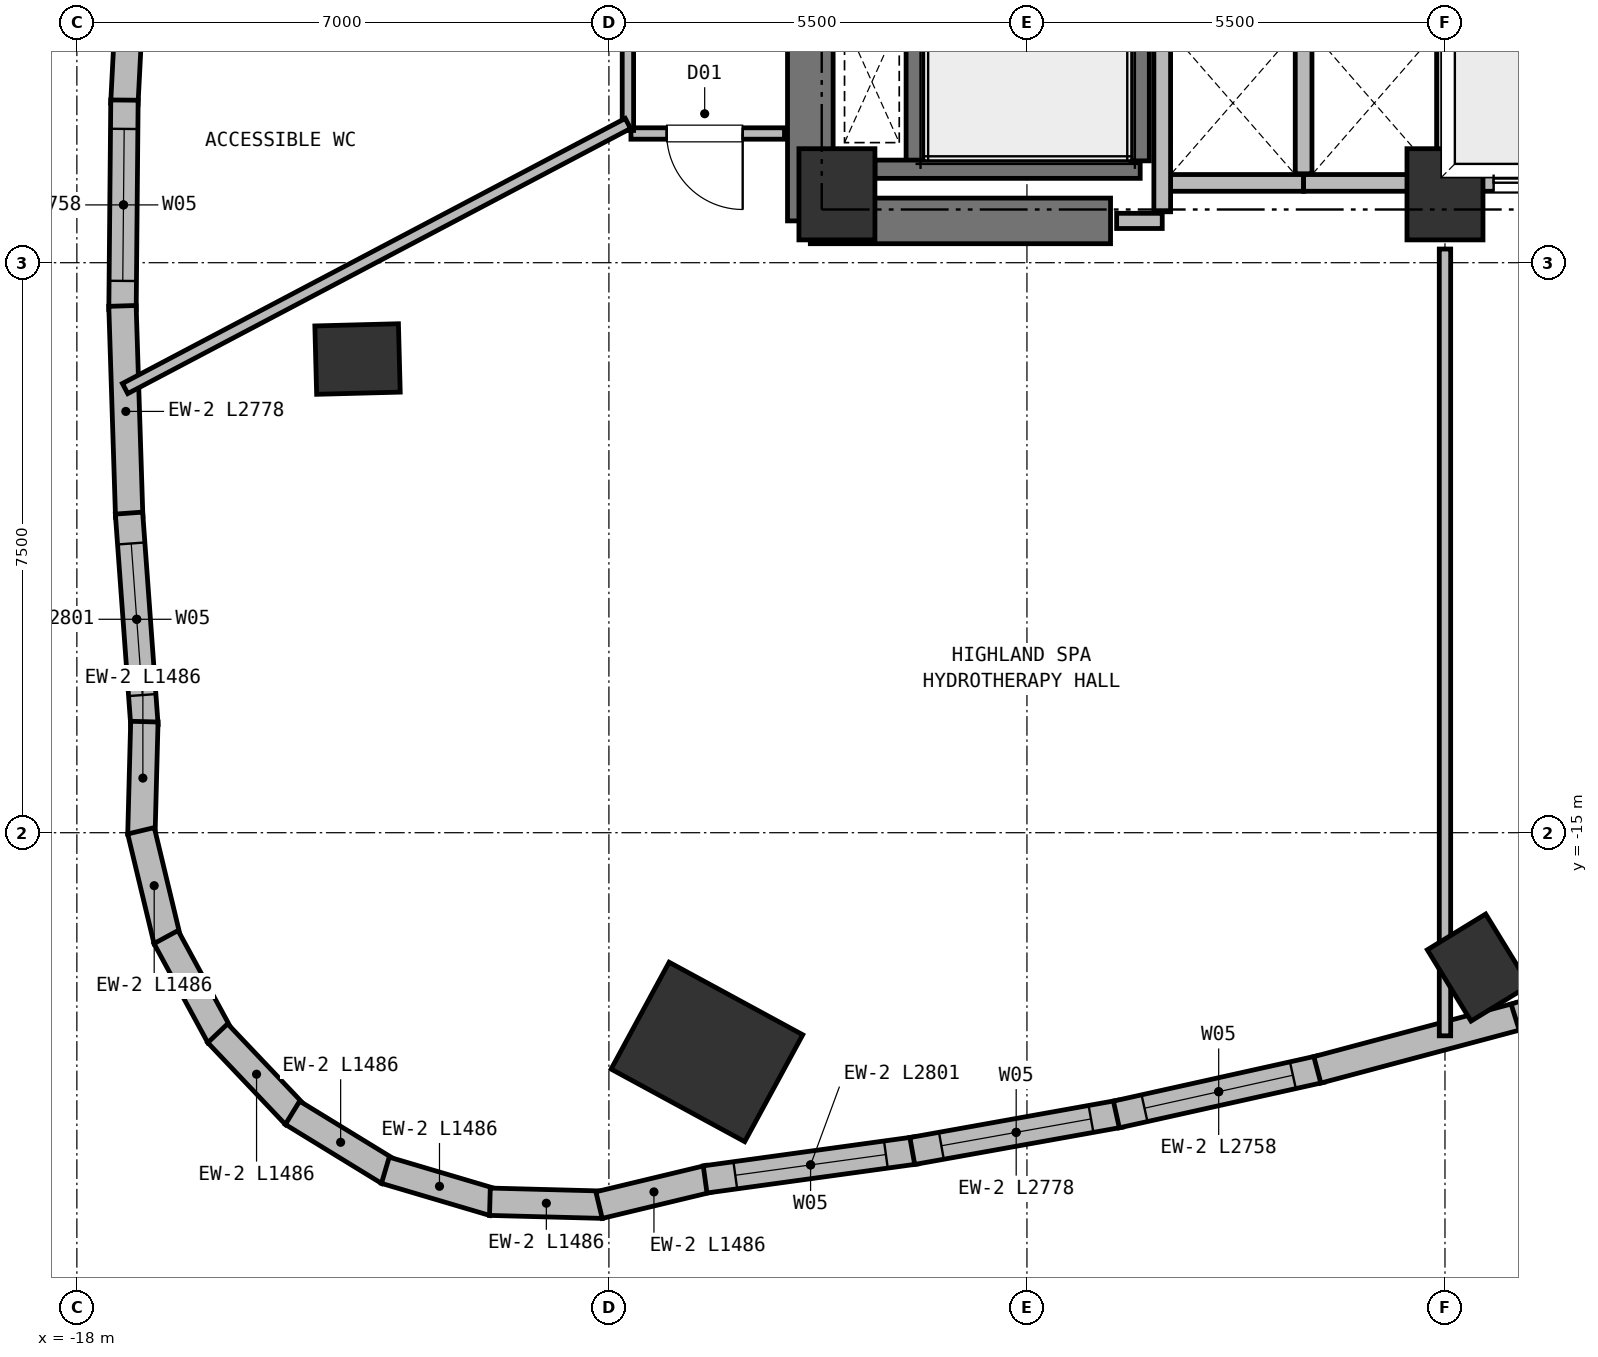
"""IFC4 building model, lengths in metres.
Left out: names, types, materials, properties, quantities, classifications, styles, units other than length and angle.
Written with IfcOpenShell. Run it as: python <this file> out.ifc"""

import sys

from ifc_helpers import new_model, si_unit, direction, frame, frame_2d, origin, origin_2d, place, context, subcontext, project, spatial, rectangle, extrude, element, fill, save


model = new_model("IFC4")
c1 = context("Model", 3, precision=1e-05, world=origin(), true_north=direction((0.0, 1.0)))
c2 = subcontext(c1, "Body", "Model", "MODEL_VIEW")
j1 = project(units=[si_unit("LENGTHUNIT", "METRE"), si_unit("PLANEANGLEUNIT", "RADIAN")], contexts=[c1])
p1 = place(None, origin())
s1 = spatial("IfcSite", under=j1, at=p1, CompositionType="ELEMENT")
p2 = place(p1, origin())
s2 = spatial("IfcBuilding", under=s1, at=p2, CompositionType="ELEMENT")
p3 = place(p2, frame((0.0, 0.0, 92.75)))
s3 = spatial("IfcBuildingStorey", under=s2, at=p3, CompositionType="ELEMENT", Elevation=92.75)
for number, where, z_axis, x_axis in (
    (1, (-8.0, -6.6, 0.0), (0.0, 0.0, 1.0), (1.0, 0.0, 0.0)),
    (2, (0.0, -6.6, 0.0), (0.0, 0.0, 1.0), (1.0, 0.0, 0.0)),
):
    element("IfcColumn", number, at=place(p3, frame(where, z_axis=z_axis, x_axis=x_axis)), inside=s3, PredefinedType="COLUMN", context=c2, shape_type="SweptSolid", body=[
        extrude(rectangle(XDim=1.0, YDim=1.2, at=origin_2d()), origin(), (0.0, 0.0, 1.0), 4.5),
    ])
p4 = place(p3, frame((-8.35, -6.95, 0.0), z_axis=(0.0, 0.0, 1.0), x_axis=(1.0, 0.0, 0.0)))
e3 = element("IfcWall", 3, at=p4, inside=s3, PredefinedType="SHEAR", context=c2, shape_type="SweptSolid", body=[
    extrude(rectangle(XDim=3.95, YDim=0.6, at=frame_2d((1.975, 0.0))), origin(), (0.0, 0.0, 1.0), 4.25),
])
p5 = place(p3, frame((-8.35, -6.95, 0.0), z_axis=(0.0, 0.0, 1.0), x_axis=(0.0, 1.0, 0.0)))
e4 = element("IfcWall", 4, at=p5, inside=s3, PredefinedType="SHEAR", context=c2, shape_type="SweptSolid", body=[
    extrude(rectangle(XDim=8.1, YDim=0.6, at=frame_2d((4.05, 0.0))), origin(), (0.0, 0.0, 1.0), 4.25),
])
p6 = place(p3, frame((-14.307, -8.768, 0.0), z_axis=(0.0, 0.0, 1.0), x_axis=(-0.026176948308, 0.999657324976, 0.0)))
e5 = element("IfcColumn", 5, at=p6, inside=s3, PredefinedType="COLUMN", context=c2, shape_type="SweptSolid", body=[
    extrude(rectangle(XDim=0.9, YDim=1.1, at=origin_2d()), origin(), (0.0, 0.0, 1.0), 4.5),
])
p7 = place(p3, frame((-9.71, -17.885, 0.0), z_axis=(0.0, 0.0, 1.0), x_axis=(0.47715876026, 0.878817112662, 0.0)))
e6 = element("IfcColumn", 6, at=p7, inside=s3, PredefinedType="COLUMN", context=c2, shape_type="SweptSolid", body=[
    extrude(rectangle(XDim=1.6, YDim=2.0, at=origin_2d()), origin(), (0.0, 0.0, 1.0), 4.5),
])
p8 = place(p3, frame((0.439, -16.774, 0.0), z_axis=(0.0, 0.0, 1.0), x_axis=(0.852640164354, 0.522498564716, 0.0)))
e7 = element("IfcColumn", 7, at=p8, inside=s3, PredefinedType="COLUMN", context=c2, shape_type="SweptSolid", body=[
    extrude(rectangle(XDim=0.9, YDim=1.1, at=origin_2d()), origin(), (0.0, 0.0, 1.0), 4.5),
])
p9 = place(p3, frame((-17.375, -5.41, 0.0), z_axis=(0.0, 0.0, 1.0), x_axis=(0.051157869298, 0.998690578913, 0.0)))
e8 = element("IfcWall", 8, at=p9, inside=s3, PredefinedType="SOLIDWALL", context=c2, shape_type="SweptSolid", body=[
    extrude(rectangle(XDim=2.744, YDim=0.36, at=frame_2d((1.372, 0.0))), origin(), (0.0, 0.0, 1.0), 4.25),
])
p10 = place(p3, frame((-17.4, -8.119, 0.0), z_axis=(0.0, 0.0, 1.0), x_axis=(0.009381778629, 0.999955990146, 0.0)))
e9 = element("IfcWall", 9, at=p10, inside=s3, PredefinedType="SOLIDWALL", context=c2, shape_type="SweptSolid", body=[
    extrude(rectangle(XDim=2.758, YDim=0.36, at=frame_2d((1.379, 0.0))), origin(), (0.0, 0.0, 1.0), 4.25),
])
p11 = place(p10, frame((0.379, 0.0, 0.72)))
e10 = element("IfcOpeningElement", 10, at=p11, cuts=e9, PredefinedType="OPENING", context=c2, shape_type="SweptSolid", body=[
    extrude(rectangle(XDim=2.0, YDim=2.15, at=frame_2d((1.0, 1.075))), frame((0.0, 0.19, 0.0), z_axis=(0.0, -1.0, 0.0), x_axis=(1.0, 0.0, 0.0)), (0.0, 0.0, 1.0), 0.38),
])
p12 = place(p3, frame((-17.312, -10.845, 0.0), z_axis=(0.0, 0.0, 1.0), x_axis=(-0.031907059623, 0.999490840151, 0.0)))
e11 = element("IfcWall", 11, at=p12, inside=s3, PredefinedType="SOLIDWALL", context=c2, shape_type="SweptSolid", body=[
    extrude(rectangle(XDim=2.778, YDim=0.36, at=frame_2d((1.389, 0.0))), origin(), (0.0, 0.0, 1.0), 4.25),
])
p13 = place(p3, frame((-17.111, -13.589, 0.0), z_axis=(0.0, 0.0, 1.0), x_axis=(-0.072603479606, 0.99736088491, 0.0)))
e12 = element("IfcWall", 12, at=p13, inside=s3, PredefinedType="SOLIDWALL", context=c2, shape_type="SweptSolid", body=[
    extrude(rectangle(XDim=2.801, YDim=0.36, at=frame_2d((1.4, 0.0))), origin(), (0.0, 0.0, 1.0), 4.25),
])
p14 = place(p13, frame((0.401, 0.0, 0.72)))
e13 = element("IfcOpeningElement", 13, at=p14, cuts=e12, PredefinedType="OPENING", context=c2, shape_type="SweptSolid", body=[
    extrude(rectangle(XDim=2.0, YDim=2.15, at=frame_2d((1.0, 1.075))), frame((0.0, 0.19, 0.0), z_axis=(0.0, -1.0, 0.0), x_axis=(1.0, 0.0, 0.0)), (0.0, 0.0, 1.0), 0.38),
])
p15 = place(p3, frame((-17.151, -15.024, 0.0), z_axis=(0.0, 0.0, 1.0), x_axis=(0.026129494011, 0.999658566483, 0.0)))
e14 = element("IfcWall", 14, at=p15, inside=s3, PredefinedType="SOLIDWALL", context=c2, shape_type="SweptSolid", body=[
    extrude(rectangle(XDim=1.486, YDim=0.36, at=frame_2d((0.743, 0.0))), origin(), (0.0, 0.0, 1.0), 4.25),
])
for number, where, z_axis, x_axis in (
    (15, (-16.809, -16.419, 0.0), (0.0, 0.0, 1.0), (-0.233, 0.972, 0.0)),
    (16, (-16.118, -17.679, 0.0), (0.0, 0.0, 1.0), (-0.477, 0.879, 0.0)),
):
    element("IfcWall", number, at=place(p3, frame(where, z_axis=z_axis, x_axis=x_axis)), inside=s3, PredefinedType="SOLIDWALL", context=c2, shape_type="SweptSolid", body=[
        extrude(rectangle(XDim=1.486, YDim=0.36, at=frame_2d((0.743, 0.0))), origin(), (0.0, 0.0, 1.0), 4.25),
    ])
p16 = place(p3, frame((-15.125, -18.717, 0.0), z_axis=(0.0, 0.0, 1.0), x_axis=(-0.688377955726, 0.725352183474, 0.0)))
e17 = element("IfcWall", 17, at=p16, inside=s3, PredefinedType="SOLIDWALL", context=c2, shape_type="SweptSolid", body=[
    extrude(rectangle(XDim=1.486, YDim=0.36, at=frame_2d((0.743, 0.0))), origin(), (0.0, 0.0, 1.0), 4.25),
])
p17 = place(p3, frame((-13.896, -19.462, 0.0), z_axis=(0.0, 0.0, 1.0), x_axis=(-0.852672081239, 0.522446477522, 0.0)))
e18 = element("IfcWall", 18, at=p17, inside=s3, PredefinedType="SOLIDWALL", context=c2, shape_type="SweptSolid", body=[
    extrude(rectangle(XDim=1.486, YDim=0.36, at=frame_2d((0.743, 0.0))), origin(), (0.0, 0.0, 1.0), 4.25),
])
for number, where, z_axis, x_axis in (
    (19, (-12.517, -19.864, 0.0), (0.0, 0.0, 1.0), (-0.959, 0.284, 0.0)),
    (20, (-11.081, -19.895, 0.0), (0.0, 0.0, 1.0), (-1.0, 0.026, 0.0)),
    (21, (-9.685, -19.553, 0.0), (0.0, 0.0, 1.0), (-0.972, -0.233, 0.0)),
):
    element("IfcWall", number, at=place(p3, frame(where, z_axis=z_axis, x_axis=x_axis)), inside=s3, PredefinedType="SOLIDWALL", context=c2, shape_type="SweptSolid", body=[
        extrude(rectangle(XDim=1.486, YDim=0.36, at=frame_2d((0.743, 0.0))), origin(), (0.0, 0.0, 1.0), 4.25),
    ])
p18 = place(p3, frame((-6.959, -19.18, 0.0), z_axis=(0.0, 0.0, 1.0), x_axis=(-0.990654861438, -0.136392615303, 0.0)))
e22 = element("IfcWall", 22, at=p18, inside=s3, PredefinedType="SOLIDWALL", context=c2, shape_type="SweptSolid", body=[
    extrude(rectangle(XDim=2.801, YDim=0.36, at=frame_2d((1.401, 0.0))), origin(), (0.0, 0.0, 1.0), 4.25),
])
p19 = place(p18, frame((0.401, 0.0, 0.72)))
e23 = element("IfcOpeningElement", 23, at=p19, cuts=e22, PredefinedType="OPENING", context=c2, shape_type="SweptSolid", body=[
    extrude(rectangle(XDim=2.0, YDim=2.15, at=frame_2d((1.0, 1.075))), frame((0.0, 0.19, 0.0), z_axis=(0.0, -1.0, 0.0), x_axis=(1.0, 0.0, 0.0)), (0.0, 0.0, 1.0), 0.38),
])
p20 = place(p3, frame((-4.275, -18.698, 0.0), z_axis=(0.0, 0.0, 1.0), x_axis=(-0.984284920637, -0.176587641147, 0.0)))
e24 = element("IfcWall", 24, at=p20, inside=s3, PredefinedType="SOLIDWALL", context=c2, shape_type="SweptSolid", body=[
    extrude(rectangle(XDim=2.778, YDim=0.36, at=frame_2d((1.389, 0.0))), origin(), (0.0, 0.0, 1.0), 4.25),
])
p21 = place(p20, frame((0.389, 0.0, 0.72)))
e25 = element("IfcOpeningElement", 25, at=p21, cuts=e24, PredefinedType="OPENING", context=c2, shape_type="SweptSolid", body=[
    extrude(rectangle(XDim=2.0, YDim=2.15, at=frame_2d((1.0, 1.075))), frame((0.0, 0.19, 0.0), z_axis=(0.0, -1.0, 0.0), x_axis=(1.0, 0.0, 0.0)), (0.0, 0.0, 1.0), 0.38),
])
p22 = place(p3, frame((-1.631, -18.109, 0.0), z_axis=(0.0, 0.0, 1.0), x_axis=(-0.976166230028, -0.217024172276, 0.0)))
e26 = element("IfcWall", 26, at=p22, inside=s3, PredefinedType="SOLIDWALL", context=c2, shape_type="SweptSolid", body=[
    extrude(rectangle(XDim=2.758, YDim=0.36, at=frame_2d((1.379, 0.0))), origin(), (0.0, 0.0, 1.0), 4.25),
])
p23 = place(p22, frame((0.379, 0.0, 0.72)))
e27 = element("IfcOpeningElement", 27, at=p23, cuts=e26, PredefinedType="OPENING", context=c2, shape_type="SweptSolid", body=[
    extrude(rectangle(XDim=2.0, YDim=2.15, at=frame_2d((1.0, 1.075))), frame((0.0, 0.19, 0.0), z_axis=(0.0, -1.0, 0.0), x_axis=(1.0, 0.0, 0.0)), (0.0, 0.0, 1.0), 0.38),
])
p24 = place(p3, frame((0.972, -17.413, 0.0), z_axis=(0.0, 0.0, 1.0), x_axis=(-0.966234939601, -0.25766265056, 0.0)))
e28 = element("IfcWall", 28, at=p24, inside=s3, PredefinedType="SOLIDWALL", context=c2, shape_type="SweptSolid", body=[
    extrude(rectangle(XDim=2.744, YDim=0.36, at=frame_2d((1.372, 0.0))), origin(), (0.0, 0.0, 1.0), 4.25),
])
p25 = place(p3, frame((3.534, -16.612, 0.0), z_axis=(0.0, 0.0, 1.0), x_axis=(-0.954503804453, -0.298198737899, 0.0)))
e29 = element("IfcWall", 29, at=p25, inside=s3, PredefinedType="SOLIDWALL", context=c2, shape_type="SweptSolid", body=[
    extrude(rectangle(XDim=2.735, YDim=0.36, at=frame_2d((1.367, 0.0))), origin(), (0.0, 0.0, 1.0), 4.25),
])
p26 = place(p3, frame((-6.97, -6.16, 0.0), z_axis=(0.0, 0.0, 1.0), x_axis=(0.0, 1.0, 0.0)))
e30 = element("IfcWall", 30, at=p26, inside=s3, PredefinedType="SHEAR", context=c2, shape_type="SweptSolid", body=[
    extrude(rectangle(XDim=7.22, YDim=0.24, at=frame_2d((3.61, 0.0))), origin(), (0.0, 0.0, 1.0), 4.25),
])
p27 = place(p3, frame((-7.5, -6.27, 0.0), z_axis=(0.0, 0.0, 1.0), x_axis=(1.0, 0.0, 0.0)))
e31 = element("IfcWall", 31, at=p27, inside=s3, PredefinedType="SHEAR", context=c2, shape_type="SweptSolid", body=[
    extrude(rectangle(XDim=3.49, YDim=0.24, at=frame_2d((1.745, 0.0))), origin(), (0.0, 0.0, 1.0), 4.25),
])
p28 = place(p3, frame((-4.01, -6.16, 0.0), z_axis=(0.0, 0.0, 1.0), x_axis=(0.0, 1.0, 0.0)))
e32 = element("IfcWall", 32, at=p28, inside=s3, PredefinedType="SHEAR", context=c2, shape_type="SweptSolid", body=[
    extrude(rectangle(XDim=7.22, YDim=0.24, at=frame_2d((3.61, 0.0))), origin(), (0.0, 0.0, 1.0), 4.25),
])
p29 = place(p3, frame((-3.72, -6.45, 0.0), z_axis=(0.0, 0.0, 1.0), x_axis=(1.0, 0.0, 0.0)))
e33 = element("IfcWall", 33, at=p29, inside=s3, PredefinedType="PARTITIONING", context=c2, shape_type="SweptSolid", body=[
    extrude(rectangle(XDim=1.86, YDim=0.22, at=frame_2d((0.93, 0.0))), origin(), (0.0, 0.0, 1.0), 3.87),
])
p30 = place(p3, frame((-3.72, -6.83, 0.0), z_axis=(0.0, 0.0, 1.0), x_axis=(0.0, 1.0, 0.0)))
e34 = element("IfcWall", 34, at=p30, inside=s3, PredefinedType="PARTITIONING", context=c2, shape_type="SweptSolid", body=[
    extrude(rectangle(XDim=2.36, YDim=0.22, at=frame_2d((1.18, 0.0))), origin(), (0.0, 0.0, 1.0), 4.25),
])
p31 = place(p3, frame((-1.86, -6.33, 0.0), z_axis=(0.0, 0.0, 1.0), x_axis=(0.0, 1.0, 0.0)))
e35 = element("IfcWall", 35, at=p31, inside=s3, PredefinedType="PARTITIONING", context=c2, shape_type="SweptSolid", body=[
    extrude(rectangle(XDim=1.86, YDim=0.22, at=frame_2d((0.93, 0.0))), origin(), (0.0, 0.0, 1.0), 4.25),
])
p32 = place(p3, frame((-1.86, -6.45, 0.0), z_axis=(0.0, 0.0, 1.0), x_axis=(1.0, 0.0, 0.0)))
e36 = element("IfcWall", 36, at=p32, inside=s3, PredefinedType="PARTITIONING", context=c2, shape_type="SweptSolid", body=[
    extrude(rectangle(XDim=1.86, YDim=0.22, at=frame_2d((0.93, 0.0))), origin(), (0.0, 0.0, 1.0), 3.87),
])
p33 = place(p3, frame((0.0, -6.33, 0.0), z_axis=(0.0, 0.0, 1.0), x_axis=(0.0, 1.0, 0.0)))
e37 = element("IfcWall", 37, at=p33, inside=s3, PredefinedType="PARTITIONING", context=c2, shape_type="SweptSolid", body=[
    extrude(rectangle(XDim=1.86, YDim=0.22, at=frame_2d((0.93, 0.0))), origin(), (0.0, 0.0, 1.0), 4.25),
])
p34 = place(p3, frame((0.0, -6.45, 0.0), z_axis=(0.0, 0.0, 1.0), x_axis=(1.0, 0.0, 0.0)))
e38 = element("IfcWall", 38, at=p34, inside=s3, PredefinedType="PARTITIONING", context=c2, shape_type="SweptSolid", body=[
    extrude(rectangle(XDim=1.86, YDim=0.22, at=frame_2d((0.93, 0.0))), origin(), (0.0, 0.0, 1.0), 3.87),
])
p35 = place(p34, frame((0.64, 0.0, 0.0)))
e39 = element("IfcOpeningElement", 39, at=p35, cuts=e38, PredefinedType="OPENING", context=c2, shape_type="SweptSolid", body=[
    extrude(rectangle(XDim=1.08, YDim=2.15, at=frame_2d((0.54, 1.075))), frame((0.0, 0.12, 0.0), z_axis=(0.0, -1.0, 0.0), x_axis=(1.0, 0.0, 0.0)), (0.0, 0.0, 1.0), 0.24),
])
p36 = place(p3, frame((-4.32, -6.95, 0.0), z_axis=(0.0, 0.0, 1.0), x_axis=(1.0, 0.0, 0.0)))
e40 = element("IfcWall", 40, at=p36, inside=s3, PredefinedType="PARTITIONING", context=c2, shape_type="SweptSolid", body=[
    extrude(rectangle(XDim=0.6, YDim=0.2, at=frame_2d((0.3, 0.0))), origin(), (0.0, 0.0, 1.0), 4.25),
])
p37 = place(p3, frame((-8.69, -5.8, 0.0), z_axis=(0.0, 0.0, 1.0), x_axis=(-1.0, 0.0, 0.0)))
e41 = element("IfcWall", 41, at=p37, inside=s3, PredefinedType="PARTITIONING", context=c2, shape_type="SweptSolid", body=[
    extrude(rectangle(XDim=2.02, YDim=0.15, at=frame_2d((1.01, 0.0))), origin(), (0.0, 0.0, 1.0), 4.25),
])
p38 = place(p37, frame((0.55, 0.0, 0.0)))
e42 = element("IfcOpeningElement", 42, at=p38, cuts=e41, PredefinedType="OPENING", context=c2, shape_type="SweptSolid", body=[
    extrude(rectangle(XDim=1.0, YDim=2.15, at=frame_2d((0.5, 1.075))), frame((0.0, 0.085, 0.0), z_axis=(0.0, -1.0, 0.0), x_axis=(1.0, 0.0, 0.0)), (0.0, 0.0, 1.0), 0.17),
])
p39 = place(p3, frame((-10.75, -5.76, 0.0), z_axis=(0.0, 0.0, 1.0), x_axis=(0.0, 1.0, 0.0)))
e43 = element("IfcWall", 43, at=p39, inside=s3, PredefinedType="PARTITIONING", context=c2, shape_type="SweptSolid", body=[
    extrude(rectangle(XDim=12.92, YDim=0.15, at=frame_2d((6.46, 0.0))), origin(), (0.0, 0.0, 1.0), 4.25),
])
p40 = place(p39, frame((3.843, 0.0, 0.0)))
e44 = element("IfcOpeningElement", 44, at=p40, cuts=e43, PredefinedType="OPENING", context=c2, shape_type="SweptSolid", body=[
    extrude(rectangle(XDim=1.0, YDim=2.15, at=frame_2d((0.5, 1.075))), frame((0.0, 0.085, 0.0), z_axis=(0.0, -1.0, 0.0), x_axis=(1.0, 0.0, 0.0)), (0.0, 0.0, 1.0), 0.17),
])
p41 = place(p39, frame((1.168, 0.0, 0.0)))
e45 = element("IfcOpeningElement", 45, at=p41, cuts=e43, PredefinedType="OPENING", context=c2, shape_type="SweptSolid", body=[
    extrude(rectangle(XDim=0.95, YDim=2.1, at=frame_2d((0.475, 1.05))), frame((0.0, 0.085, 0.0), z_axis=(0.0, -1.0, 0.0), x_axis=(1.0, 0.0, 0.0)), (0.0, 0.0, 1.0), 0.17),
])
p42 = place(p39, frame((8.702, 0.0, 0.0)))
e46 = element("IfcOpeningElement", 46, at=p42, cuts=e43, PredefinedType="OPENING", context=c2, shape_type="SweptSolid", body=[
    extrude(rectangle(XDim=1.0, YDim=2.15, at=frame_2d((0.5, 1.075))), frame((0.0, 0.085, 0.0), z_axis=(0.0, -1.0, 0.0), x_axis=(1.0, 0.0, 0.0)), (0.0, 0.0, 1.0), 0.17),
])
p43 = place(p3, frame((-10.75, -5.668, 0.0), z_axis=(0.0, 0.0, 1.0), x_axis=(-0.884575956978, -0.466396158149, 0.0)))
e47 = element("IfcWall", 47, at=p43, inside=s3, PredefinedType="PARTITIONING", context=c2, shape_type="SweptSolid", body=[
    extrude(rectangle(XDim=7.479, YDim=0.15, at=frame_2d((3.739, 0.0))), origin(), (0.0, 0.0, 1.0), 4.25),
])
p44 = place(p3, frame((0.0, -7.32, 0.0), z_axis=(0.0, 0.0, 1.0), x_axis=(0.0, -1.0, 0.0)))
e48 = element("IfcWall", 48, at=p44, inside=s3, PredefinedType="PARTITIONING", context=c2, shape_type="SweptSolid", body=[
    extrude(rectangle(XDim=10.353, YDim=0.15, at=frame_2d((5.176, 0.0))), origin(), (0.0, 0.0, 1.0), 4.25),
])
p45 = place(p11, origin())
e49 = element("IfcWindow", 49, at=p45, inside=s3, PartitioningType="SINGLE_PANEL", PredefinedType="WINDOW", context=c2, shape_type="SweptSolid", body=[
    extrude(rectangle(XDim=2.0, YDim=2.15, at=frame_2d((1.0, 1.075))), frame((0.0, 0.03, 0.0), z_axis=(0.0, -1.0, 0.0), x_axis=(1.0, 0.0, 0.0)), (0.0, 0.0, 1.0), 0.06),
])
fill(e10, e49)
p46 = place(p14, origin())
e50 = element("IfcWindow", 50, at=p46, inside=s3, PartitioningType="SINGLE_PANEL", PredefinedType="WINDOW", context=c2, shape_type="SweptSolid", body=[
    extrude(rectangle(XDim=2.0, YDim=2.15, at=frame_2d((1.0, 1.075))), frame((0.0, 0.03, 0.0), z_axis=(0.0, -1.0, 0.0), x_axis=(1.0, 0.0, 0.0)), (0.0, 0.0, 1.0), 0.06),
])
fill(e13, e50)
p47 = place(p19, origin())
e51 = element("IfcWindow", 51, at=p47, inside=s3, PartitioningType="SINGLE_PANEL", PredefinedType="WINDOW", context=c2, shape_type="SweptSolid", body=[
    extrude(rectangle(XDim=2.0, YDim=2.15, at=frame_2d((1.0, 1.075))), frame((0.0, 0.03, 0.0), z_axis=(0.0, -1.0, 0.0), x_axis=(1.0, 0.0, 0.0)), (0.0, 0.0, 1.0), 0.06),
])
fill(e23, e51)
p48 = place(p21, origin())
e52 = element("IfcWindow", 52, at=p48, inside=s3, PartitioningType="SINGLE_PANEL", PredefinedType="WINDOW", context=c2, shape_type="SweptSolid", body=[
    extrude(rectangle(XDim=2.0, YDim=2.15, at=frame_2d((1.0, 1.075))), frame((0.0, 0.03, 0.0), z_axis=(0.0, -1.0, 0.0), x_axis=(1.0, 0.0, 0.0)), (0.0, 0.0, 1.0), 0.06),
])
fill(e25, e52)
p49 = place(p23, origin())
e53 = element("IfcWindow", 53, at=p49, inside=s3, PartitioningType="SINGLE_PANEL", PredefinedType="WINDOW", context=c2, shape_type="SweptSolid", body=[
    extrude(rectangle(XDim=2.0, YDim=2.15, at=frame_2d((1.0, 1.075))), frame((0.0, 0.03, 0.0), z_axis=(0.0, -1.0, 0.0), x_axis=(1.0, 0.0, 0.0)), (0.0, 0.0, 1.0), 0.06),
])
fill(e27, e53)
p50 = place(p35, origin())
e54 = element("IfcDoor", 54, at=p50, inside=s3, OperationType="DOUBLE_DOOR_SLIDING", PredefinedType="DOOR", context=c2, shape_type="SweptSolid", body=[
    extrude(rectangle(XDim=1.08, YDim=2.15, at=frame_2d((0.54, 1.075))), frame((0.0, 0.025, 0.0), z_axis=(0.0, -1.0, 0.0), x_axis=(1.0, 0.0, 0.0)), (0.0, 0.0, 1.0), 0.05),
])
fill(e39, e54)
p51 = place(p38, origin())
e55 = element("IfcDoor", 55, at=p51, inside=s3, OperationType="SINGLE_SWING_LEFT", PredefinedType="DOOR", context=c2, shape_type="SweptSolid", body=[
    extrude(rectangle(XDim=1.0, YDim=2.15, at=frame_2d((0.5, 1.075))), frame((0.0, 0.025, 0.0), z_axis=(0.0, -1.0, 0.0), x_axis=(1.0, 0.0, 0.0)), (0.0, 0.0, 1.0), 0.05),
])
fill(e42, e55)
save(model, sys.argv[1])
